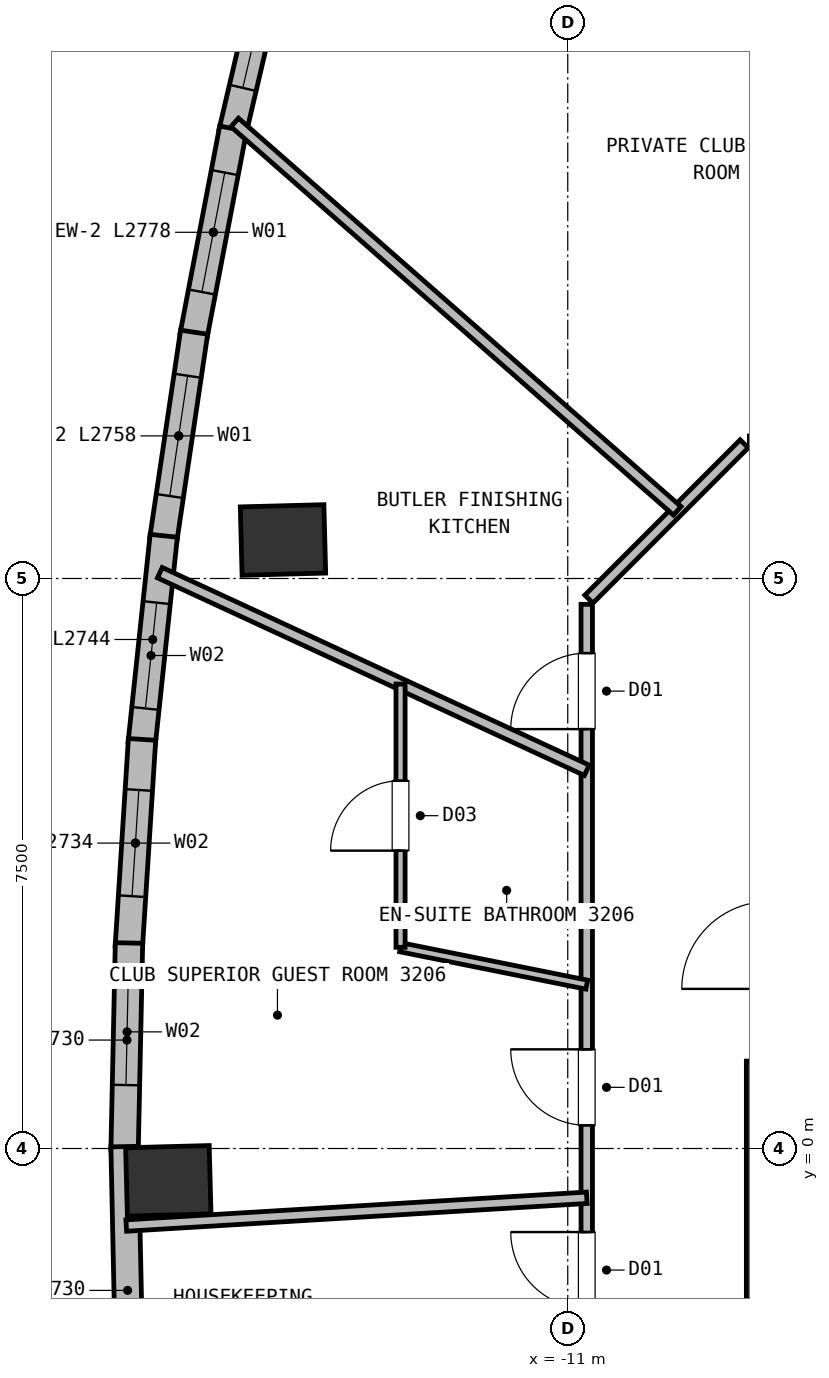
"""IFC4 building model, lengths in metres.
Left out: names, types, materials, properties, quantities, classifications, styles, units other than length and angle.
Written with IfcOpenShell. Run it as: python <this file> out.ifc"""

import sys

from ifc_helpers import new_model, si_unit, direction, frame, frame_2d, origin, origin_2d, place, context, subcontext, project, spatial, rectangle, extrude, element, fill, save


model = new_model("IFC4")
c1 = context("Model", 3, precision=1e-05, world=origin(), true_north=direction((0.0, 1.0)))
c2 = subcontext(c1, "Body", "Model", "MODEL_VIEW")
j1 = project(units=[si_unit("LENGTHUNIT", "METRE"), si_unit("PLANEANGLEUNIT", "RADIAN")], contexts=[c1])
p1 = place(None, origin())
s1 = spatial("IfcSite", under=j1, at=p1, CompositionType="ELEMENT")
p2 = place(p1, origin())
s2 = spatial("IfcBuilding", under=s1, at=p2, CompositionType="ELEMENT")
p3 = place(p2, frame((0.0, 0.0, 119.75)))
s3 = spatial("IfcBuildingStorey", under=s2, at=p3, CompositionType="ELEMENT", Elevation=119.75)
p4 = place(p3, frame((-8.35, -6.95, 0.0), z_axis=(0.0, 0.0, 1.0), x_axis=(0.0, 1.0, 0.0)))
e1 = element("IfcWall", 1, at=p4, inside=s3, PredefinedType="SHEAR", context=c2, shape_type="SweptSolid", body=[
    extrude(rectangle(XDim=8.1, YDim=0.6, at=frame_2d((4.05, 0.0))), origin(), (0.0, 0.0, 1.0), 3.5),
])
for number, where, z_axis, x_axis in (
    (2, (-14.747, 8.007, 0.0), (0.0, 0.0, 1.0), (-0.026, 1.0, 0.0)),
    (3, (-16.255, -0.426, 0.0), (0.0, 0.0, 1.0), (-0.026, 1.0, 0.0)),
):
    element("IfcColumn", number, at=place(p3, frame(where, z_axis=z_axis, x_axis=x_axis)), inside=s3, PredefinedType="COLUMN", context=c2, shape_type="SweptSolid", body=[
        extrude(rectangle(XDim=0.9, YDim=1.1, at=origin_2d()), origin(), (0.0, 0.0, 1.0), 3.75),
    ])
p5 = place(p3, frame((-15.412, 13.371, 0.0), z_axis=(0.0, 0.0, 1.0), x_axis=(0.22776138749, 0.973716976523, 0.0)))
e4 = element("IfcWall", 4, at=p5, inside=s3, PredefinedType="SOLIDWALL", context=c2, shape_type="SweptSolid", body=[
    extrude(rectangle(XDim=2.801, YDim=0.36, at=frame_2d((1.4, 0.0))), origin(), (0.0, 0.0, 1.0), 3.5),
])
p6 = place(p5, frame((0.601, 0.0, 0.72)))
e5 = element("IfcOpeningElement", 5, at=p6, cuts=e4, PredefinedType="OPENING", context=c2, shape_type="SweptSolid", body=[
    extrude(rectangle(XDim=1.6, YDim=1.88, at=frame_2d((0.8, 0.94))), frame((0.0, 0.19, 0.0), z_axis=(0.0, -1.0, 0.0), x_axis=(1.0, 0.0, 0.0)), (0.0, 0.0, 1.0), 0.38),
])
p7 = place(p3, frame((-15.924, 10.691, 0.0), z_axis=(0.0, 0.0, 1.0), x_axis=(0.187911722621, 0.982185921555, 0.0)))
e6 = element("IfcWall", 6, at=p7, inside=s3, PredefinedType="SOLIDWALL", context=c2, shape_type="SweptSolid", body=[
    extrude(rectangle(XDim=2.778, YDim=0.36, at=frame_2d((1.389, 0.0))), origin(), (0.0, 0.0, 1.0), 3.5),
])
p8 = place(p7, frame((0.589, 0.0, 0.72)))
e7 = element("IfcOpeningElement", 7, at=p8, cuts=e6, PredefinedType="OPENING", context=c2, shape_type="SweptSolid", body=[
    extrude(rectangle(XDim=1.6, YDim=1.88, at=frame_2d((0.8, 0.94))), frame((0.0, 0.19, 0.0), z_axis=(0.0, -1.0, 0.0), x_axis=(1.0, 0.0, 0.0)), (0.0, 0.0, 1.0), 0.38),
])
p9 = place(p3, frame((-16.321, 8.012, 0.0), z_axis=(0.0, 0.0, 1.0), x_axis=(0.147193392227, 0.98910773189, 0.0)))
e8 = element("IfcWall", 8, at=p9, inside=s3, PredefinedType="SOLIDWALL", context=c2, shape_type="SweptSolid", body=[
    extrude(rectangle(XDim=2.758, YDim=0.36, at=frame_2d((1.379, 0.0))), origin(), (0.0, 0.0, 1.0), 3.5),
])
p10 = place(p9, frame((0.579, 0.0, 0.72)))
e9 = element("IfcOpeningElement", 9, at=p10, cuts=e8, PredefinedType="OPENING", context=c2, shape_type="SweptSolid", body=[
    extrude(rectangle(XDim=1.6, YDim=1.88, at=frame_2d((0.8, 0.94))), frame((0.0, 0.19, 0.0), z_axis=(0.0, -1.0, 0.0), x_axis=(1.0, 0.0, 0.0)), (0.0, 0.0, 1.0), 0.38),
])
p11 = place(p3, frame((-16.605, 5.333, 0.0), z_axis=(0.0, 0.0, 1.0), x_axis=(0.105606362296, 0.994408012962, 0.0)))
e10 = element("IfcWall", 10, at=p11, inside=s3, PredefinedType="SOLIDWALL", context=c2, shape_type="SweptSolid", body=[
    extrude(rectangle(XDim=2.744, YDim=0.36, at=frame_2d((1.372, 0.0))), origin(), (0.0, 0.0, 1.0), 3.5),
])
p12 = place(p11, frame((0.46, 0.0, 0.72)))
e11 = element("IfcOpeningElement", 11, at=p12, cuts=e10, PredefinedType="OPENING", context=c2, shape_type="SweptSolid", body=[
    extrude(rectangle(XDim=1.4, YDim=1.84, at=frame_2d((0.7, 0.92))), frame((0.0, 0.19, 0.0), z_axis=(0.0, -1.0, 0.0), x_axis=(1.0, 0.0, 0.0)), (0.0, 0.0, 1.0), 0.38),
])
p13 = place(p3, frame((-16.775, 2.654, 0.0), z_axis=(0.0, 0.0, 1.0), x_axis=(0.063662313476, 0.99797149751, 0.0)))
e12 = element("IfcWall", 12, at=p13, inside=s3, PredefinedType="SOLIDWALL", context=c2, shape_type="SweptSolid", body=[
    extrude(rectangle(XDim=2.734, YDim=0.36, at=frame_2d((1.367, 0.0))), origin(), (0.0, 0.0, 1.0), 3.5),
])
p14 = place(p13, frame((0.667, 0.0, 0.72)))
e13 = element("IfcOpeningElement", 13, at=p14, cuts=e12, PredefinedType="OPENING", context=c2, shape_type="SweptSolid", body=[
    extrude(rectangle(XDim=1.4, YDim=1.84, at=frame_2d((0.7, 0.92))), frame((0.0, 0.19, 0.0), z_axis=(0.0, -1.0, 0.0), x_axis=(1.0, 0.0, 0.0)), (0.0, 0.0, 1.0), 0.38),
])
p15 = place(p3, frame((-16.831, -0.025, 0.0), z_axis=(0.0, 0.0, 1.0), x_axis=(0.021286998628, 0.999773406172, 0.0)))
e14 = element("IfcWall", 14, at=p15, inside=s3, PredefinedType="SOLIDWALL", context=c2, shape_type="SweptSolid", body=[
    extrude(rectangle(XDim=2.73, YDim=0.36, at=frame_2d((1.365, 0.0))), origin(), (0.0, 0.0, 1.0), 3.5),
])
p16 = place(p15, frame((0.86, 0.0, 0.72)))
e15 = element("IfcOpeningElement", 15, at=p16, cuts=e14, PredefinedType="OPENING", context=c2, shape_type="SweptSolid", body=[
    extrude(rectangle(XDim=1.4, YDim=1.84, at=frame_2d((0.7, 0.92))), frame((0.0, 0.19, 0.0), z_axis=(0.0, -1.0, 0.0), x_axis=(1.0, 0.0, 0.0)), (0.0, 0.0, 1.0), 0.38),
])
p17 = place(p3, frame((-16.773, -2.704, 0.0), z_axis=(0.0, 0.0, 1.0), x_axis=(-0.021286998628, 0.999773406172, 0.0)))
e16 = element("IfcWall", 16, at=p17, inside=s3, PredefinedType="SOLIDWALL", context=c2, shape_type="SweptSolid", body=[
    extrude(rectangle(XDim=2.73, YDim=0.36, at=frame_2d((1.365, 0.0))), origin(), (0.0, 0.0, 1.0), 3.5),
])
p18 = place(p3, frame((-10.722, 7.228, 0.0), z_axis=(0.0, 0.0, 1.0), x_axis=(0.707106781187, 0.707106781187, 0.0)))
e17 = element("IfcWall", 17, at=p18, inside=s3, PredefinedType="PARTITIONING", context=c2, shape_type="SweptSolid", body=[
    extrude(rectangle(XDim=2.89, YDim=0.15, at=frame_2d((1.445, 0.0))), origin(), (0.0, 0.0, 1.0), 3.5),
])
p19 = place(p3, frame((-10.75, -5.76, 0.0), z_axis=(0.0, 0.0, 1.0), x_axis=(0.0, 1.0, 0.0)))
e18 = element("IfcWall", 18, at=p19, inside=s3, PredefinedType="PARTITIONING", context=c2, shape_type="SweptSolid", body=[
    extrude(rectangle(XDim=12.92, YDim=0.15, at=frame_2d((6.46, 0.0))), origin(), (0.0, 0.0, 1.0), 3.5),
])
p20 = place(p19, frame((3.66, 0.0, 0.0)))
e19 = element("IfcOpeningElement", 19, at=p20, cuts=e18, PredefinedType="OPENING", context=c2, shape_type="SweptSolid", body=[
    extrude(rectangle(XDim=1.0, YDim=2.15, at=frame_2d((0.5, 1.075))), frame((0.0, 0.085, 0.0), z_axis=(0.0, -1.0, 0.0), x_axis=(1.0, 0.0, 0.0)), (0.0, 0.0, 1.0), 0.17),
])
p21 = place(p19, frame((1.589, 0.0, 0.0)))
e20 = element("IfcOpeningElement", 20, at=p21, cuts=e18, PredefinedType="OPENING", context=c2, shape_type="SweptSolid", body=[
    extrude(rectangle(XDim=0.95, YDim=2.1, at=frame_2d((0.475, 1.05))), frame((0.0, 0.085, 0.0), z_axis=(0.0, -1.0, 0.0), x_axis=(1.0, 0.0, 0.0)), (0.0, 0.0, 1.0), 0.17),
])
p22 = place(p19, frame((11.278, 0.0, 0.0)))
e21 = element("IfcOpeningElement", 21, at=p22, cuts=e18, PredefinedType="OPENING", context=c2, shape_type="SweptSolid", body=[
    extrude(rectangle(XDim=1.0, YDim=2.15, at=frame_2d((0.5, 1.075))), frame((0.0, 0.085, 0.0), z_axis=(0.0, -1.0, 0.0), x_axis=(1.0, 0.0, 0.0)), (0.0, 0.0, 1.0), 0.17),
])
p23 = place(p19, frame((6.065, 0.0, 0.0)))
e22 = element("IfcOpeningElement", 22, at=p23, cuts=e18, PredefinedType="OPENING", context=c2, shape_type="SweptSolid", body=[
    extrude(rectangle(XDim=1.0, YDim=2.15, at=frame_2d((0.5, 1.075))), frame((0.0, 0.085, 0.0), z_axis=(0.0, -1.0, 0.0), x_axis=(1.0, 0.0, 0.0)), (0.0, 0.0, 1.0), 0.17),
])
p24 = place(p3, frame((-9.56, 8.39, 0.0), z_axis=(0.0, 0.0, 1.0), x_axis=(-0.751560639242, 0.659664009586, 0.0)))
e23 = element("IfcWall", 23, at=p24, inside=s3, PredefinedType="PARTITIONING", context=c2, shape_type="SweptSolid", body=[
    extrude(rectangle(XDim=7.747, YDim=0.15, at=frame_2d((3.874, 0.0))), origin(), (0.0, 0.0, 1.0), 3.5),
])
p25 = place(p3, frame((-10.75, 4.977, 0.0), z_axis=(0.0, 0.0, 1.0), x_axis=(-0.907495868458, 0.420061005964, 0.0)))
e24 = element("IfcWall", 24, at=p25, inside=s3, PredefinedType="PARTITIONING", context=c2, shape_type="SweptSolid", body=[
    extrude(rectangle(XDim=6.189, YDim=0.15, at=frame_2d((3.095, 0.0))), origin(), (0.0, 0.0, 1.0), 3.5),
])
p26 = place(p3, frame((-10.75, 2.156, 0.0), z_axis=(0.0, 0.0, 1.0), x_axis=(-0.980467777356, 0.196679784337, 0.0)))
e25 = element("IfcWall", 25, at=p26, inside=s3, PredefinedType="PARTITIONING", context=c2, shape_type="SweptSolid", body=[
    extrude(rectangle(XDim=2.499, YDim=0.12, at=frame_2d((1.25, 0.0))), origin(), (0.0, 0.0, 1.0), 3.5),
])
p27 = place(p3, frame((-13.2, 2.647, 0.0), z_axis=(0.0, 0.0, 1.0), x_axis=(0.0, 1.0, 0.0)))
e26 = element("IfcWall", 26, at=p27, inside=s3, PredefinedType="PARTITIONING", context=c2, shape_type="SweptSolid", body=[
    extrude(rectangle(XDim=3.463, YDim=0.12, at=frame_2d((1.731, 0.0))), origin(), (0.0, 0.0, 1.0), 3.5),
])
p28 = place(p27, frame((1.271, 0.0, 0.0)))
e27 = element("IfcOpeningElement", 27, at=p28, cuts=e26, PredefinedType="OPENING", context=c2, shape_type="SweptSolid", body=[
    extrude(rectangle(XDim=0.92, YDim=2.1, at=frame_2d((0.46, 1.05))), frame((0.0, 0.07, 0.0), z_axis=(0.0, -1.0, 0.0), x_axis=(1.0, 0.0, 0.0)), (0.0, 0.0, 1.0), 0.14),
])
p29 = place(p3, frame((-10.75, -0.648, 0.0), z_axis=(0.0, 0.0, 1.0), x_axis=(-0.998185459259, -0.060214524199, 0.0)))
e28 = element("IfcWall", 28, at=p29, inside=s3, PredefinedType="PARTITIONING", context=c2, shape_type="SweptSolid", body=[
    extrude(rectangle(XDim=6.07, YDim=0.15, at=frame_2d((3.035, 0.0))), origin(), (0.0, 0.0, 1.0), 3.5),
])
p30 = place(p6, origin())
e29 = element("IfcWindow", 29, at=p30, inside=s3, PartitioningType="SINGLE_PANEL", PredefinedType="WINDOW", context=c2, shape_type="SweptSolid", body=[
    extrude(rectangle(XDim=1.6, YDim=1.88, at=frame_2d((0.8, 0.94))), frame((0.0, 0.03, 0.0), z_axis=(0.0, -1.0, 0.0), x_axis=(1.0, 0.0, 0.0)), (0.0, 0.0, 1.0), 0.06),
])
fill(e5, e29)
p31 = place(p8, origin())
e30 = element("IfcWindow", 30, at=p31, inside=s3, PartitioningType="SINGLE_PANEL", PredefinedType="WINDOW", context=c2, shape_type="SweptSolid", body=[
    extrude(rectangle(XDim=1.6, YDim=1.88, at=frame_2d((0.8, 0.94))), frame((0.0, 0.03, 0.0), z_axis=(0.0, -1.0, 0.0), x_axis=(1.0, 0.0, 0.0)), (0.0, 0.0, 1.0), 0.06),
])
fill(e7, e30)
p32 = place(p10, origin())
e31 = element("IfcWindow", 31, at=p32, inside=s3, PartitioningType="SINGLE_PANEL", PredefinedType="WINDOW", context=c2, shape_type="SweptSolid", body=[
    extrude(rectangle(XDim=1.6, YDim=1.88, at=frame_2d((0.8, 0.94))), frame((0.0, 0.03, 0.0), z_axis=(0.0, -1.0, 0.0), x_axis=(1.0, 0.0, 0.0)), (0.0, 0.0, 1.0), 0.06),
])
fill(e9, e31)
p33 = place(p12, origin())
e32 = element("IfcWindow", 32, at=p33, inside=s3, PartitioningType="SINGLE_PANEL", PredefinedType="WINDOW", context=c2, shape_type="SweptSolid", body=[
    extrude(rectangle(XDim=1.4, YDim=1.84, at=frame_2d((0.7, 0.92))), frame((0.0, 0.03, 0.0), z_axis=(0.0, -1.0, 0.0), x_axis=(1.0, 0.0, 0.0)), (0.0, 0.0, 1.0), 0.06),
])
fill(e11, e32)
p34 = place(p14, origin())
e33 = element("IfcWindow", 33, at=p34, inside=s3, PartitioningType="SINGLE_PANEL", PredefinedType="WINDOW", context=c2, shape_type="SweptSolid", body=[
    extrude(rectangle(XDim=1.4, YDim=1.84, at=frame_2d((0.7, 0.92))), frame((0.0, 0.03, 0.0), z_axis=(0.0, -1.0, 0.0), x_axis=(1.0, 0.0, 0.0)), (0.0, 0.0, 1.0), 0.06),
])
fill(e13, e33)
p35 = place(p16, origin())
e34 = element("IfcWindow", 34, at=p35, inside=s3, PartitioningType="SINGLE_PANEL", PredefinedType="WINDOW", context=c2, shape_type="SweptSolid", body=[
    extrude(rectangle(XDim=1.4, YDim=1.84, at=frame_2d((0.7, 0.92))), frame((0.0, 0.03, 0.0), z_axis=(0.0, -1.0, 0.0), x_axis=(1.0, 0.0, 0.0)), (0.0, 0.0, 1.0), 0.06),
])
fill(e15, e34)
p36 = place(p28, origin())
e35 = element("IfcDoor", 35, at=p36, inside=s3, OperationType="SINGLE_SWING_LEFT", PredefinedType="DOOR", context=c2, shape_type="SweptSolid", body=[
    extrude(rectangle(XDim=0.92, YDim=2.1, at=frame_2d((0.46, 1.05))), frame((0.0, 0.025, 0.0), z_axis=(0.0, -1.0, 0.0), x_axis=(1.0, 0.0, 0.0)), (0.0, 0.0, 1.0), 0.05),
])
fill(e27, e35)
p37 = place(p20, origin())
e36 = element("IfcDoor", 36, at=p37, inside=s3, OperationType="SINGLE_SWING_RIGHT", PredefinedType="DOOR", context=c2, shape_type="SweptSolid", body=[
    extrude(rectangle(XDim=1.0, YDim=2.15, at=frame_2d((0.5, 1.075))), frame((0.0, 0.025, 0.0), z_axis=(0.0, -1.0, 0.0), x_axis=(1.0, 0.0, 0.0)), (0.0, 0.0, 1.0), 0.05),
])
fill(e19, e36)
p38 = place(p22, origin())
e37 = element("IfcDoor", 37, at=p38, inside=s3, OperationType="SINGLE_SWING_LEFT", PredefinedType="DOOR", context=c2, shape_type="SweptSolid", body=[
    extrude(rectangle(XDim=1.0, YDim=2.15, at=frame_2d((0.5, 1.075))), frame((0.0, 0.025, 0.0), z_axis=(0.0, -1.0, 0.0), x_axis=(1.0, 0.0, 0.0)), (0.0, 0.0, 1.0), 0.05),
])
fill(e21, e37)
p39 = place(p23, origin())
e38 = element("IfcDoor", 38, at=p39, inside=s3, OperationType="SINGLE_SWING_RIGHT", PredefinedType="DOOR", context=c2, shape_type="SweptSolid", body=[
    extrude(rectangle(XDim=1.0, YDim=2.15, at=frame_2d((0.5, 1.075))), frame((0.0, 0.025, 0.0), z_axis=(0.0, -1.0, 0.0), x_axis=(1.0, 0.0, 0.0)), (0.0, 0.0, 1.0), 0.05),
])
fill(e22, e38)
save(model, sys.argv[1])
